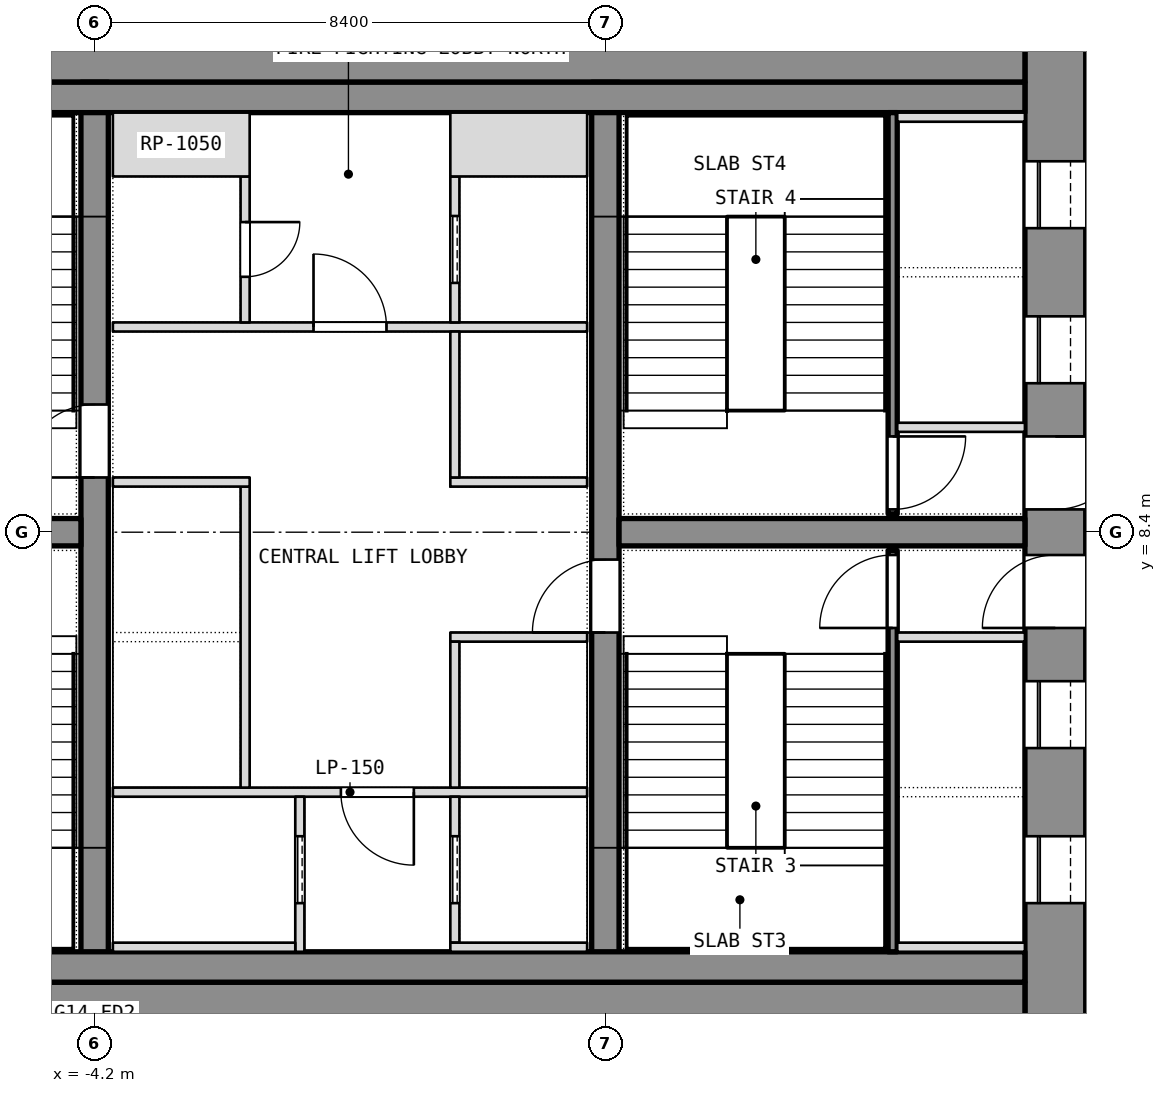
"""IFC4 building model, lengths in metres.
Left out: names, types, materials, properties, quantities, classifications, styles, units other than length and angle.
Written with IfcOpenShell. Run it as: python <this file> out.ifc"""

import sys

from ifc_helpers import new_model, si_unit, direction, frame, frame_2d, origin, place, context, subcontext, project, spatial, rectangle, extrude, element, fill, save


model = new_model("IFC4")
c1 = context("Model", 3, precision=1e-05, world=origin(), true_north=direction((0.0, 1.0)))
c2 = subcontext(c1, "Body", "Model", "MODEL_VIEW")
j1 = project(units=[si_unit("LENGTHUNIT", "METRE"), si_unit("PLANEANGLEUNIT", "RADIAN")], contexts=[c1])
p1 = place(None, origin())
s1 = spatial("IfcSite", under=j1, at=p1, CompositionType="ELEMENT")
p2 = place(p1, origin())
s2 = spatial("IfcBuilding", under=s1, at=p2, CompositionType="ELEMENT")
p3 = place(p2, frame((0.0, 0.0, 162.5)))
s3 = spatial("IfcBuildingStorey", under=s2, at=p3, CompositionType="ELEMENT", Elevation=162.5)
p4 = place(p3, frame((11.6, 0.0, 0.0), z_axis=(0.0, 0.0, 1.0), x_axis=(0.0, 1.0, 0.0)))
e1 = element("IfcWall", 1, at=p4, inside=s3, PredefinedType="SHEAR", context=c2, shape_type="SweptSolid", body=[
    extrude(rectangle(XDim=16.8, YDim=1.0, at=frame_2d((8.4, 0.0))), origin(), (0.0, 0.0, 1.0), 3.6),
])
p5 = place(p4, frame((2.3, 0.0, 0.0)))
e2 = element("IfcOpeningElement", 2, at=p5, cuts=e1, PredefinedType="OPENING", context=c2, shape_type="SweptSolid", body=[
    extrude(rectangle(XDim=1.1, YDim=2.1, at=frame_2d((0.55, 1.05))), frame((0.0, 0.5, 0.0), z_axis=(0.0, -1.0, 0.0), x_axis=(1.0, 0.0, 0.0)), (0.0, 0.0, 1.0), 1.0),
])
p6 = place(p4, frame((4.85, 0.0, 0.0)))
e3 = element("IfcOpeningElement", 3, at=p6, cuts=e1, PredefinedType="OPENING", context=c2, shape_type="SweptSolid", body=[
    extrude(rectangle(XDim=1.1, YDim=2.1, at=frame_2d((0.55, 1.05))), frame((0.0, 0.5, 0.0), z_axis=(0.0, -1.0, 0.0), x_axis=(1.0, 0.0, 0.0)), (0.0, 0.0, 1.0), 1.0),
])
p7 = place(p4, frame((6.825, 0.0, 0.0)))
e4 = element("IfcOpeningElement", 4, at=p7, cuts=e1, PredefinedType="OPENING", context=c2, shape_type="SweptSolid", body=[
    extrude(rectangle(XDim=1.2, YDim=2.1, at=frame_2d((0.6, 1.05))), frame((0.0, 0.5, 0.0), z_axis=(0.0, -1.0, 0.0), x_axis=(1.0, 0.0, 0.0)), (0.0, 0.0, 1.0), 1.0),
])
p8 = place(p4, frame((13.4, 0.0, 0.0)))
e5 = element("IfcOpeningElement", 5, at=p8, cuts=e1, PredefinedType="OPENING", context=c2, shape_type="SweptSolid", body=[
    extrude(rectangle(XDim=1.1, YDim=2.1, at=frame_2d((0.55, 1.05))), frame((0.0, 0.5, 0.0), z_axis=(0.0, -1.0, 0.0), x_axis=(1.0, 0.0, 0.0)), (0.0, 0.0, 1.0), 1.0),
])
p9 = place(p4, frame((10.85, 0.0, 0.0)))
e6 = element("IfcOpeningElement", 6, at=p9, cuts=e1, PredefinedType="OPENING", context=c2, shape_type="SweptSolid", body=[
    extrude(rectangle(XDim=1.1, YDim=2.1, at=frame_2d((0.55, 1.05))), frame((0.0, 0.5, 0.0), z_axis=(0.0, -1.0, 0.0), x_axis=(1.0, 0.0, 0.0)), (0.0, 0.0, 1.0), 1.0),
])
p10 = place(p4, frame((8.775, 0.0, 0.0)))
e7 = element("IfcOpeningElement", 7, at=p10, cuts=e1, PredefinedType="OPENING", context=c2, shape_type="SweptSolid", body=[
    extrude(rectangle(XDim=1.2, YDim=2.1, at=frame_2d((0.6, 1.05))), frame((0.0, 0.5, 0.0), z_axis=(0.0, -1.0, 0.0), x_axis=(1.0, 0.0, 0.0)), (0.0, 0.0, 1.0), 1.0),
])
for number, where, z_axis, x_axis in (
    (8, (-11.1, 0.5, 0.0), (0.0, 0.0, 1.0), (1.0, 0.0, 0.0)),
    (9, (-11.1, 16.3, 0.0), (0.0, 0.0, 1.0), (1.0, 0.0, 0.0)),
):
    element("IfcWall", number, at=place(p3, frame(where, z_axis=z_axis, x_axis=x_axis)), inside=s3, PredefinedType="SHEAR", context=c2, shape_type="SweptSolid", body=[
        extrude(rectangle(XDim=22.2, YDim=1.0, at=frame_2d((11.1, 0.0))), origin(), (0.0, 0.0, 1.0), 3.6),
    ])
p11 = place(p3, frame((-4.2, 1.0, 0.0), z_axis=(0.0, 0.0, 1.0), x_axis=(0.0, 1.0, 0.0)))
e10 = element("IfcWall", 10, at=p11, inside=s3, PredefinedType="SHEAR", context=c2, shape_type="SweptSolid", body=[
    extrude(rectangle(XDim=14.8, YDim=0.45, at=frame_2d((7.4, 0.0))), origin(), (0.0, 0.0, 1.0), 3.6),
])
p12 = place(p11, frame((8.3, 0.0, 0.0)))
e11 = element("IfcOpeningElement", 11, at=p12, cuts=e10, PredefinedType="OPENING", context=c2, shape_type="SweptSolid", body=[
    extrude(rectangle(XDim=1.2, YDim=2.1, at=frame_2d((0.6, 1.05))), frame((0.0, 0.225, 0.0), z_axis=(0.0, -1.0, 0.0), x_axis=(1.0, 0.0, 0.0)), (0.0, 0.0, 1.0), 0.45),
])
p13 = place(p3, frame((4.2, 1.0, 0.0), z_axis=(0.0, 0.0, 1.0), x_axis=(0.0, 1.0, 0.0)))
e12 = element("IfcWall", 12, at=p13, inside=s3, PredefinedType="SHEAR", context=c2, shape_type="SweptSolid", body=[
    extrude(rectangle(XDim=14.8, YDim=0.45, at=frame_2d((7.4, 0.0))), origin(), (0.0, 0.0, 1.0), 3.6),
])
p14 = place(p13, frame((5.75, 0.0, 0.0)))
e13 = element("IfcOpeningElement", 13, at=p14, cuts=e12, PredefinedType="OPENING", context=c2, shape_type="SweptSolid", body=[
    extrude(rectangle(XDim=1.2, YDim=2.1, at=frame_2d((0.6, 1.05))), frame((0.0, 0.225, 0.0), z_axis=(0.0, -1.0, 0.0), x_axis=(1.0, 0.0, 0.0)), (0.0, 0.0, 1.0), 0.45),
])
for number, where, z_axis, x_axis in (
    (14, (-11.1, 8.4, 0.0), (0.0, 0.0, 1.0), (1.0, 0.0, 0.0)),
    (15, (4.425, 8.4, 0.0), (0.0, 0.0, 1.0), (1.0, 0.0, 0.0)),
):
    element("IfcWall", number, at=place(p3, frame(where, z_axis=z_axis, x_axis=x_axis)), inside=s3, PredefinedType="SHEAR", context=c2, shape_type="SweptSolid", body=[
        extrude(rectangle(XDim=6.675, YDim=0.45, at=frame_2d((3.337, 0.0))), origin(), (0.0, 0.0, 1.0), 3.6),
    ])
for number, where, z_axis, x_axis in (
    (16, (-11.1, 1.25, 0.0), (0.0, 0.0, 1.0), (1.0, 0.0, 0.0)),
    (17, (-11.1, 15.55, 0.0), (0.0, 0.0, 1.0), (1.0, 0.0, 0.0)),
):
    element("IfcWall", number, at=place(p3, frame(where, z_axis=z_axis, x_axis=x_axis)), inside=s3, PredefinedType="PARTITIONING", context=c2, shape_type="SweptSolid", body=[
        extrude(rectangle(XDim=22.2, YDim=0.5, at=frame_2d((11.1, 0.0))), origin(), (0.0, 0.0, 1.0), 3.34),
    ])
p15 = place(p3, frame((8.925, 1.5, 0.0), z_axis=(0.0, 0.0, 1.0), x_axis=(0.0, 1.0, 0.0)))
e18 = element("IfcWall", 18, at=p15, inside=s3, PredefinedType="SHEAR", context=c2, shape_type="SweptSolid", body=[
    extrude(rectangle(XDim=6.6, YDim=0.15, at=frame_2d((3.3, 0.0))), origin(), (0.0, 0.0, 1.0), 3.34),
])
p16 = place(p15, frame((5.325, 0.0, 0.0)))
e19 = element("IfcOpeningElement", 19, at=p16, cuts=e18, PredefinedType="OPENING", context=c2, shape_type="SweptSolid", body=[
    extrude(rectangle(XDim=1.2, YDim=2.1, at=frame_2d((0.6, 1.05))), frame((0.0, 0.075, 0.0), z_axis=(0.0, -1.0, 0.0), x_axis=(1.0, 0.0, 0.0)), (0.0, 0.0, 1.0), 0.15),
])
for number, where, z_axis, x_axis in (
    (20, (9.0, 6.675, 0.0), (0.0, 0.0, 1.0), (1.0, 0.0, 0.0)),
    (21, (9.0, 1.575, 0.0), (0.0, 0.0, 1.0), (1.0, 0.0, 0.0)),
):
    element("IfcWall", number, at=place(p3, frame(where, z_axis=z_axis, x_axis=x_axis)), inside=s3, PredefinedType="SHEAR", context=c2, shape_type="SweptSolid", body=[
        extrude(rectangle(XDim=2.1, YDim=0.15, at=frame_2d((1.05, 0.0))), origin(), (0.0, 0.0, 1.0), 3.6),
    ])
p17 = place(p3, frame((8.925, 8.7, 0.0), z_axis=(0.0, 0.0, 1.0), x_axis=(0.0, 1.0, 0.0)))
e22 = element("IfcWall", 22, at=p17, inside=s3, PredefinedType="SHEAR", context=c2, shape_type="SweptSolid", body=[
    extrude(rectangle(XDim=6.6, YDim=0.15, at=frame_2d((3.3, 0.0))), origin(), (0.0, 0.0, 1.0), 3.34),
])
p18 = place(p17, frame((0.075, 0.0, 0.0)))
e23 = element("IfcOpeningElement", 23, at=p18, cuts=e22, PredefinedType="OPENING", context=c2, shape_type="SweptSolid", body=[
    extrude(rectangle(XDim=1.2, YDim=2.1, at=frame_2d((0.6, 1.05))), frame((0.0, 0.075, 0.0), z_axis=(0.0, -1.0, 0.0), x_axis=(1.0, 0.0, 0.0)), (0.0, 0.0, 1.0), 0.15),
])
for number, where, z_axis, x_axis in (
    (24, (9.0, 10.125, 0.0), (0.0, 0.0, 1.0), (1.0, 0.0, 0.0)),
    (25, (9.0, 15.225, 0.0), (0.0, 0.0, 1.0), (1.0, 0.0, 0.0)),
):
    element("IfcWall", number, at=place(p3, frame(where, z_axis=z_axis, x_axis=x_axis)), inside=s3, PredefinedType="SHEAR", context=c2, shape_type="SweptSolid", body=[
        extrude(rectangle(XDim=2.1, YDim=0.15, at=frame_2d((1.05, 0.0))), origin(), (0.0, 0.0, 1.0), 3.6),
    ])
p19 = place(p3, frame((-3.9, 4.125, 0.0), z_axis=(0.0, 0.0, 1.0), x_axis=(1.0, 0.0, 0.0)))
e26 = element("IfcWall", 26, at=p19, inside=s3, PredefinedType="PARTITIONING", context=c2, shape_type="SweptSolid", body=[
    extrude(rectangle(XDim=7.8, YDim=0.15, at=frame_2d((3.9, 0.0))), origin(), (0.0, 0.0, 1.0), 3.34),
])
p20 = place(p19, frame((3.75, 0.0, 0.0)))
e27 = element("IfcOpeningElement", 27, at=p20, cuts=e26, PredefinedType="OPENING", context=c2, shape_type="SweptSolid", body=[
    extrude(rectangle(XDim=1.2, YDim=2.1, at=frame_2d((0.6, 1.05))), frame((0.0, 0.075, 0.0), z_axis=(0.0, -1.0, 0.0), x_axis=(1.0, 0.0, 0.0)), (0.0, 0.0, 1.0), 0.15),
])
p21 = place(p3, frame((-3.9, 11.775, 0.0), z_axis=(0.0, 0.0, 1.0), x_axis=(1.0, 0.0, 0.0)))
e28 = element("IfcWall", 28, at=p21, inside=s3, PredefinedType="PARTITIONING", context=c2, shape_type="SweptSolid", body=[
    extrude(rectangle(XDim=7.8, YDim=0.15, at=frame_2d((3.9, 0.0))), origin(), (0.0, 0.0, 1.0), 3.34),
])
p22 = place(p21, frame((3.3, 0.0, 0.0)))
e29 = element("IfcOpeningElement", 29, at=p22, cuts=e28, PredefinedType="OPENING", context=c2, shape_type="SweptSolid", body=[
    extrude(rectangle(XDim=1.2, YDim=2.1, at=frame_2d((0.6, 1.05))), frame((0.0, 0.075, 0.0), z_axis=(0.0, -1.0, 0.0), x_axis=(1.0, 0.0, 0.0)), (0.0, 0.0, 1.0), 0.15),
])
p23 = place(p3, frame((-0.825, 1.5, 0.0), z_axis=(0.0, 0.0, 1.0), x_axis=(0.0, 1.0, 0.0)))
e30 = element("IfcWall", 30, at=p23, inside=s3, PredefinedType="SHEAR", context=c2, shape_type="SweptSolid", body=[
    extrude(rectangle(XDim=2.55, YDim=0.15, at=frame_2d((1.275, 0.0))), origin(), (0.0, 0.0, 1.0), 3.6),
])
p24 = place(p23, frame((0.8, 0.0, 0.0)))
e31 = element("IfcOpeningElement", 31, at=p24, cuts=e30, PredefinedType="OPENING", context=c2, shape_type="SweptSolid", body=[
    extrude(rectangle(XDim=1.1, YDim=2.1, at=frame_2d((0.55, 1.05))), frame((0.0, 0.075, 0.0), z_axis=(0.0, -1.0, 0.0), x_axis=(1.0, 0.0, 0.0)), (0.0, 0.0, 1.0), 0.15),
])
p25 = place(p3, frame((-3.9, 1.575, 0.0), z_axis=(0.0, 0.0, 1.0), x_axis=(1.0, 0.0, 0.0)))
e32 = element("IfcWall", 32, at=p25, inside=s3, PredefinedType="SHEAR", context=c2, shape_type="SweptSolid", body=[
    extrude(rectangle(XDim=3.0, YDim=0.15, at=frame_2d((1.5, 0.0))), origin(), (0.0, 0.0, 1.0), 3.6),
])
p26 = place(p3, frame((-1.725, 4.2, 0.0), z_axis=(0.0, 0.0, 1.0), x_axis=(0.0, 1.0, 0.0)))
e33 = element("IfcWall", 33, at=p26, inside=s3, PredefinedType="SHEAR", context=c2, shape_type="SweptSolid", body=[
    extrude(rectangle(XDim=4.95, YDim=0.15, at=frame_2d((2.475, 0.0))), origin(), (0.0, 0.0, 1.0), 3.6),
])
p27 = place(p3, frame((-3.9, 9.225, 0.0), z_axis=(0.0, 0.0, 1.0), x_axis=(1.0, 0.0, 0.0)))
e34 = element("IfcWall", 34, at=p27, inside=s3, PredefinedType="SHEAR", context=c2, shape_type="SweptSolid", body=[
    extrude(rectangle(XDim=2.25, YDim=0.15, at=frame_2d((1.125, 0.0))), origin(), (0.0, 0.0, 1.0), 3.6),
])
p28 = place(p3, frame((-1.725, 11.85, 0.0), z_axis=(0.0, 0.0, 1.0), x_axis=(0.0, 1.0, 0.0)))
e35 = element("IfcWall", 35, at=p28, inside=s3, PredefinedType="PARTITIONING", context=c2, shape_type="SweptSolid", body=[
    extrude(rectangle(XDim=2.4, YDim=0.15, at=frame_2d((1.2, 0.0))), origin(), (0.0, 0.0, 1.0), 3.34),
])
p29 = place(p28, frame((0.75, 0.0, 0.0)))
e36 = element("IfcOpeningElement", 36, at=p29, cuts=e35, PredefinedType="OPENING", context=c2, shape_type="SweptSolid", body=[
    extrude(rectangle(XDim=0.9, YDim=2.1, at=frame_2d((0.45, 1.05))), frame((0.0, 0.075, 0.0), z_axis=(0.0, -1.0, 0.0), x_axis=(1.0, 0.0, 0.0)), (0.0, 0.0, 1.0), 0.15),
])
p30 = place(p3, frame((-3.9, 14.775, 0.0), z_axis=(0.0, 0.0, 1.0), x_axis=(1.0, 0.0, 0.0)))
e37 = element("IfcWall", 37, at=p30, inside=s3, PredefinedType="PARTITIONING", context=c2, shape_type="SweptSolid", body=[
    extrude(rectangle(XDim=2.25, YDim=1.05, at=frame_2d((1.125, 0.0))), origin(), (0.0, 0.0, 1.0), 3.34),
])
p31 = place(p3, frame((1.725, 1.65, 0.0), z_axis=(0.0, 0.0, 1.0), x_axis=(0.0, 1.0, 0.0)))
e38 = element("IfcWall", 38, at=p31, inside=s3, PredefinedType="SHEAR", context=c2, shape_type="SweptSolid", body=[
    extrude(rectangle(XDim=2.4, YDim=0.15, at=frame_2d((1.2, 0.0))), origin(), (0.0, 0.0, 1.0), 3.6),
])
p32 = place(p31, frame((0.65, 0.0, 0.0)))
e39 = element("IfcOpeningElement", 39, at=p32, cuts=e38, PredefinedType="OPENING", context=c2, shape_type="SweptSolid", body=[
    extrude(rectangle(XDim=1.1, YDim=2.1, at=frame_2d((0.55, 1.05))), frame((0.0, 0.075, 0.0), z_axis=(0.0, -1.0, 0.0), x_axis=(1.0, 0.0, 0.0)), (0.0, 0.0, 1.0), 0.15),
])
p33 = place(p3, frame((1.65, 1.575, 0.0), z_axis=(0.0, 0.0, 1.0), x_axis=(1.0, 0.0, 0.0)))
e40 = element("IfcWall", 40, at=p33, inside=s3, PredefinedType="SHEAR", context=c2, shape_type="SweptSolid", body=[
    extrude(rectangle(XDim=2.25, YDim=0.15, at=frame_2d((1.125, 0.0))), origin(), (0.0, 0.0, 1.0), 3.6),
])
p34 = place(p3, frame((1.725, 11.85, 0.0), z_axis=(0.0, 0.0, 1.0), x_axis=(0.0, 1.0, 0.0)))
e41 = element("IfcWall", 41, at=p34, inside=s3, PredefinedType="SHEAR", context=c2, shape_type="SweptSolid", body=[
    extrude(rectangle(XDim=2.4, YDim=0.15, at=frame_2d((1.2, 0.0))), origin(), (0.0, 0.0, 1.0), 3.6),
])
p35 = place(p34, frame((0.65, 0.0, 0.0)))
e42 = element("IfcOpeningElement", 42, at=p35, cuts=e41, PredefinedType="OPENING", context=c2, shape_type="SweptSolid", body=[
    extrude(rectangle(XDim=1.1, YDim=2.1, at=frame_2d((0.55, 1.05))), frame((0.0, 0.075, 0.0), z_axis=(0.0, -1.0, 0.0), x_axis=(1.0, 0.0, 0.0)), (0.0, 0.0, 1.0), 0.15),
])
p36 = place(p3, frame((1.65, 14.775, 0.0), z_axis=(0.0, 0.0, 1.0), x_axis=(1.0, 0.0, 0.0)))
e43 = element("IfcWall", 43, at=p36, inside=s3, PredefinedType="SHEAR", context=c2, shape_type="SweptSolid", body=[
    extrude(rectangle(XDim=2.25, YDim=1.05, at=frame_2d((1.125, 0.0))), origin(), (0.0, 0.0, 1.0), 3.6),
])
for number, where, z_axis, x_axis in (
    (44, (1.65, 6.675, 0.0), (0.0, 0.0, 1.0), (1.0, 0.0, 0.0)),
    (45, (1.65, 9.225, 0.0), (0.0, 0.0, 1.0), (1.0, 0.0, 0.0)),
):
    element("IfcWall", number, at=place(p3, frame(where, z_axis=z_axis, x_axis=x_axis)), inside=s3, PredefinedType="SHEAR", context=c2, shape_type="SweptSolid", body=[
        extrude(rectangle(XDim=2.25, YDim=0.15, at=frame_2d((1.125, 0.0))), origin(), (0.0, 0.0, 1.0), 3.6),
    ])
p37 = place(p3, frame((1.725, 4.2, 0.0), z_axis=(0.0, 0.0, 1.0), x_axis=(0.0, 1.0, 0.0)))
e46 = element("IfcWall", 46, at=p37, inside=s3, PredefinedType="SHEAR", context=c2, shape_type="SweptSolid", body=[
    extrude(rectangle(XDim=2.4, YDim=0.15, at=frame_2d((1.2, 0.0))), origin(), (0.0, 0.0, 1.0), 3.6),
])
p38 = place(p3, frame((1.725, 9.3, 0.0), z_axis=(0.0, 0.0, 1.0), x_axis=(0.0, 1.0, 0.0)))
e47 = element("IfcWall", 47, at=p38, inside=s3, PredefinedType="SHEAR", context=c2, shape_type="SweptSolid", body=[
    extrude(rectangle(XDim=2.4, YDim=0.15, at=frame_2d((1.2, 0.0))), origin(), (0.0, 0.0, 1.0), 3.6),
])
p39 = place(p5, origin())
e48 = element("IfcDoor", 48, at=p39, inside=s3, OperationType="SLIDING_TO_LEFT", PredefinedType="DOOR", context=c2, shape_type="SweptSolid", body=[
    extrude(rectangle(XDim=1.1, YDim=2.1, at=frame_2d((0.55, 1.05))), frame((0.0, 0.025, 0.0), z_axis=(0.0, -1.0, 0.0), x_axis=(1.0, 0.0, 0.0)), (0.0, 0.0, 1.0), 0.05),
])
fill(e2, e48)
p40 = place(p6, origin())
e49 = element("IfcDoor", 49, at=p40, inside=s3, OperationType="SLIDING_TO_LEFT", PredefinedType="DOOR", context=c2, shape_type="SweptSolid", body=[
    extrude(rectangle(XDim=1.1, YDim=2.1, at=frame_2d((0.55, 1.05))), frame((0.0, 0.025, 0.0), z_axis=(0.0, -1.0, 0.0), x_axis=(1.0, 0.0, 0.0)), (0.0, 0.0, 1.0), 0.05),
])
fill(e3, e49)
p41 = place(p7, origin())
e50 = element("IfcDoor", 50, at=p41, inside=s3, OperationType="SINGLE_SWING_LEFT", PredefinedType="DOOR", context=c2, shape_type="SweptSolid", body=[
    extrude(rectangle(XDim=1.2, YDim=2.1, at=frame_2d((0.6, 1.05))), frame((0.0, 0.025, 0.0), z_axis=(0.0, -1.0, 0.0), x_axis=(1.0, 0.0, 0.0)), (0.0, 0.0, 1.0), 0.05),
])
fill(e4, e50)
p42 = place(p16, origin())
e51 = element("IfcDoor", 51, at=p42, inside=s3, OperationType="SINGLE_SWING_LEFT", PredefinedType="DOOR", context=c2, shape_type="SweptSolid", body=[
    extrude(rectangle(XDim=1.2, YDim=2.1, at=frame_2d((0.6, 1.05))), frame((0.0, 0.025, 0.0), z_axis=(0.0, -1.0, 0.0), x_axis=(1.0, 0.0, 0.0)), (0.0, 0.0, 1.0), 0.05),
])
fill(e19, e51)
p43 = place(p8, origin())
e52 = element("IfcDoor", 52, at=p43, inside=s3, OperationType="SLIDING_TO_LEFT", PredefinedType="DOOR", context=c2, shape_type="SweptSolid", body=[
    extrude(rectangle(XDim=1.1, YDim=2.1, at=frame_2d((0.55, 1.05))), frame((0.0, 0.025, 0.0), z_axis=(0.0, -1.0, 0.0), x_axis=(1.0, 0.0, 0.0)), (0.0, 0.0, 1.0), 0.05),
])
fill(e5, e52)
p44 = place(p9, origin())
e53 = element("IfcDoor", 53, at=p44, inside=s3, OperationType="SLIDING_TO_LEFT", PredefinedType="DOOR", context=c2, shape_type="SweptSolid", body=[
    extrude(rectangle(XDim=1.1, YDim=2.1, at=frame_2d((0.55, 1.05))), frame((0.0, 0.025, 0.0), z_axis=(0.0, -1.0, 0.0), x_axis=(1.0, 0.0, 0.0)), (0.0, 0.0, 1.0), 0.05),
])
fill(e6, e53)
p45 = place(p10, origin())
e54 = element("IfcDoor", 54, at=p45, inside=s3, OperationType="SINGLE_SWING_LEFT", PredefinedType="DOOR", context=c2, shape_type="SweptSolid", body=[
    extrude(rectangle(XDim=1.2, YDim=2.1, at=frame_2d((0.6, 1.05))), frame((0.0, 0.025, 0.0), z_axis=(0.0, -1.0, 0.0), x_axis=(1.0, 0.0, 0.0)), (0.0, 0.0, 1.0), 0.05),
])
fill(e7, e54)
p46 = place(p18, origin())
e55 = element("IfcDoor", 55, at=p46, inside=s3, OperationType="SINGLE_SWING_LEFT", PredefinedType="DOOR", context=c2, shape_type="SweptSolid", body=[
    extrude(rectangle(XDim=1.2, YDim=2.1, at=frame_2d((0.6, 1.05))), frame((0.0, 0.025, 0.0), z_axis=(0.0, -1.0, 0.0), x_axis=(1.0, 0.0, 0.0)), (0.0, 0.0, 1.0), 0.05),
])
fill(e23, e55)
p47 = place(p24, origin())
e56 = element("IfcDoor", 56, at=p47, inside=s3, OperationType="SLIDING_TO_LEFT", PredefinedType="DOOR", context=c2, shape_type="SweptSolid", body=[
    extrude(rectangle(XDim=1.1, YDim=2.1, at=frame_2d((0.55, 1.05))), frame((0.0, 0.025, 0.0), z_axis=(0.0, -1.0, 0.0), x_axis=(1.0, 0.0, 0.0)), (0.0, 0.0, 1.0), 0.05),
])
fill(e31, e56)
p48 = place(p32, origin())
e57 = element("IfcDoor", 57, at=p48, inside=s3, OperationType="SLIDING_TO_LEFT", PredefinedType="DOOR", context=c2, shape_type="SweptSolid", body=[
    extrude(rectangle(XDim=1.1, YDim=2.1, at=frame_2d((0.55, 1.05))), frame((0.0, 0.025, 0.0), z_axis=(0.0, -1.0, 0.0), x_axis=(1.0, 0.0, 0.0)), (0.0, 0.0, 1.0), 0.05),
])
fill(e39, e57)
p49 = place(p35, origin())
e58 = element("IfcDoor", 58, at=p49, inside=s3, OperationType="SLIDING_TO_LEFT", PredefinedType="DOOR", context=c2, shape_type="SweptSolid", body=[
    extrude(rectangle(XDim=1.1, YDim=2.1, at=frame_2d((0.55, 1.05))), frame((0.0, 0.025, 0.0), z_axis=(0.0, -1.0, 0.0), x_axis=(1.0, 0.0, 0.0)), (0.0, 0.0, 1.0), 0.05),
])
fill(e42, e58)
p50 = place(p20, origin())
e59 = element("IfcDoor", 59, at=p50, inside=s3, OperationType="SINGLE_SWING_LEFT", PredefinedType="DOOR", context=c2, shape_type="SweptSolid", body=[
    extrude(rectangle(XDim=1.2, YDim=2.1, at=frame_2d((0.6, 1.05))), frame((0.0, 0.025, 0.0), z_axis=(0.0, -1.0, 0.0), x_axis=(1.0, 0.0, 0.0)), (0.0, 0.0, 1.0), 0.05),
])
fill(e27, e59)
p51 = place(p22, origin())
e60 = element("IfcDoor", 60, at=p51, inside=s3, OperationType="SINGLE_SWING_LEFT", PredefinedType="DOOR", context=c2, shape_type="SweptSolid", body=[
    extrude(rectangle(XDim=1.2, YDim=2.1, at=frame_2d((0.6, 1.05))), frame((0.0, 0.025, 0.0), z_axis=(0.0, -1.0, 0.0), x_axis=(1.0, 0.0, 0.0)), (0.0, 0.0, 1.0), 0.05),
])
fill(e29, e60)
p52 = place(p29, origin())
e61 = element("IfcDoor", 61, at=p52, inside=s3, OperationType="SINGLE_SWING_LEFT", PredefinedType="DOOR", context=c2, shape_type="SweptSolid", body=[
    extrude(rectangle(XDim=0.9, YDim=2.1, at=frame_2d((0.45, 1.05))), frame((0.0, 0.025, 0.0), z_axis=(0.0, -1.0, 0.0), x_axis=(1.0, 0.0, 0.0)), (0.0, 0.0, 1.0), 0.05),
])
fill(e36, e61)
p53 = place(p12, origin())
e62 = element("IfcDoor", 62, at=p53, inside=s3, OperationType="SINGLE_SWING_LEFT", PredefinedType="DOOR", context=c2, shape_type="SweptSolid", body=[
    extrude(rectangle(XDim=1.2, YDim=2.1, at=frame_2d((0.6, 1.05))), frame((0.0, 0.025, 0.0), z_axis=(0.0, -1.0, 0.0), x_axis=(1.0, 0.0, 0.0)), (0.0, 0.0, 1.0), 0.05),
])
fill(e11, e62)
p54 = place(p14, origin())
e63 = element("IfcDoor", 63, at=p54, inside=s3, OperationType="SINGLE_SWING_LEFT", PredefinedType="DOOR", context=c2, shape_type="SweptSolid", body=[
    extrude(rectangle(XDim=1.2, YDim=2.1, at=frame_2d((0.6, 1.05))), frame((0.0, 0.025, 0.0), z_axis=(0.0, -1.0, 0.0), x_axis=(1.0, 0.0, 0.0)), (0.0, 0.0, 1.0), 0.05),
])
fill(e13, e63)
save(model, sys.argv[1])
